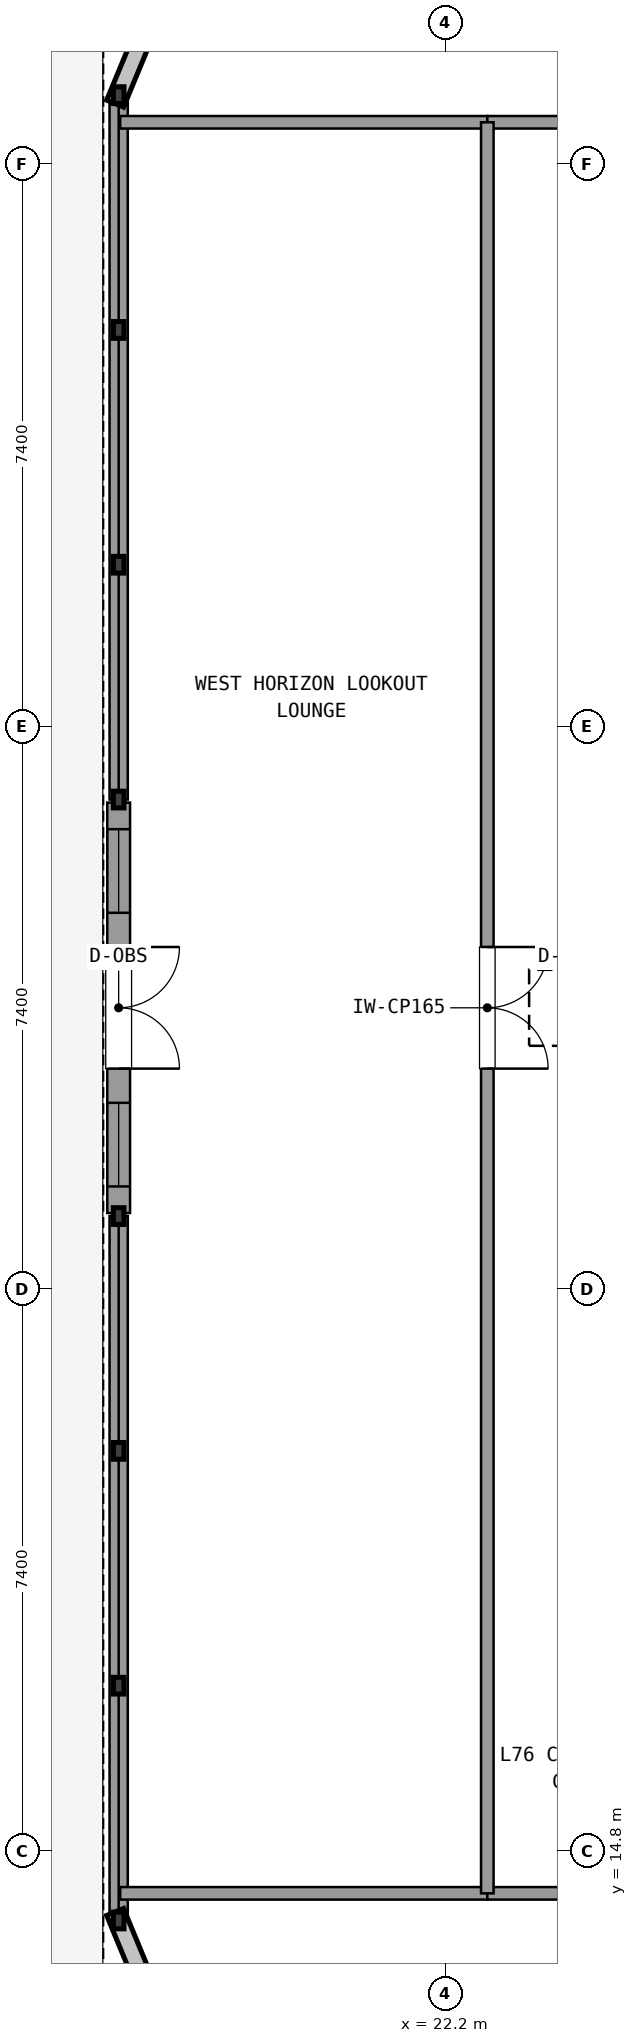
"""IFC4 building model, lengths in metres.
Left out: names, types, materials, properties, quantities, classifications, styles, units other than length and angle.
Written with IfcOpenShell. Run it as: python <this file> out.ifc"""

import sys

from ifc_helpers import new_model, si_unit, direction, frame, frame_2d, origin, origin_2d, place, context, subcontext, project, spatial, rectangle, extrude, element, fill, save


model = new_model("IFC4")
c1 = context("Model", 3, precision=1e-05, world=origin(), true_north=direction((0.0, 1.0)))
c2 = subcontext(c1, "Body", "Model", "MODEL_VIEW")
j1 = project(units=[si_unit("LENGTHUNIT", "METRE"), si_unit("PLANEANGLEUNIT", "RADIAN")], contexts=[c1])
p1 = place(None, origin())
s1 = spatial("IfcSite", under=j1, at=p1, CompositionType="ELEMENT")
p2 = place(p1, origin())
s2 = spatial("IfcBuilding", under=s1, at=p2, CompositionType="ELEMENT")
p3 = place(p2, frame((0.0, 0.0, 294.66)))
s3 = spatial("IfcBuildingStorey", under=s2, at=p3, CompositionType="ELEMENT", Elevation=294.66)
p4 = place(p3, frame((17.9, 28.6, 0.0), z_axis=(0.0, 0.0, 1.0), x_axis=(0.0, -1.0, 0.0)))
e1 = element("IfcWall", 1, at=p4, inside=s3, PredefinedType="SOLIDWALL", context=c2, shape_type="SweptSolid", body=[
    extrude(rectangle(XDim=5.4, YDim=0.3, at=frame_2d((2.7, 0.0))), origin(), (0.0, 0.0, 1.0), 3.46),
])
p5 = place(p4, frame((1.9, 0.0, 0.0)))
e2 = element("IfcOpeningElement", 2, at=p5, cuts=e1, PredefinedType="OPENING", context=c2, shape_type="SweptSolid", body=[
    extrude(rectangle(XDim=1.6, YDim=2.2, at=frame_2d((0.8, 1.1))), frame((0.0, 0.16, 0.0), z_axis=(0.0, -1.0, 0.0), x_axis=(1.0, 0.0, 0.0)), (0.0, 0.0, 1.0), 0.32),
])
p6 = place(p4, frame((0.35, 0.0, 0.4)))
e3 = element("IfcOpeningElement", 3, at=p6, cuts=e1, PredefinedType="OPENING", context=c2, shape_type="SweptSolid", body=[
    extrude(rectangle(XDim=1.1, YDim=1.8, at=frame_2d((0.55, 0.9))), frame((0.0, 0.16, 0.0), z_axis=(0.0, -1.0, 0.0), x_axis=(1.0, 0.0, 0.0)), (0.0, 0.0, 1.0), 0.32),
])
p7 = place(p4, frame((3.95, 0.0, 0.4)))
e4 = element("IfcOpeningElement", 4, at=p7, cuts=e1, PredefinedType="OPENING", context=c2, shape_type="SweptSolid", body=[
    extrude(rectangle(XDim=1.1, YDim=1.8, at=frame_2d((0.55, 0.9))), frame((0.0, 0.16, 0.0), z_axis=(0.0, -1.0, 0.0), x_axis=(1.0, 0.0, 0.0)), (0.0, 0.0, 1.0), 0.32),
])
p8 = place(p3, frame((17.9, 37.907, 0.0), z_axis=(0.0, 0.0, 1.0), x_axis=(0.0, -1.0, 0.0)))
e5 = element("IfcWall", 5, at=p8, inside=s3, PredefinedType="SOLIDWALL", context=c2, shape_type="SweptSolid", body=[
    extrude(rectangle(XDim=9.267, YDim=0.24, at=frame_2d((4.634, 0.0))), origin(), (0.0, 0.0, 1.0), 0.85),
])
p9 = place(p3, frame((17.9, 23.16, 0.0), z_axis=(0.0, 0.0, 1.0), x_axis=(0.0, -1.0, 0.0)))
e6 = element("IfcWall", 6, at=p9, inside=s3, PredefinedType="SOLIDWALL", context=c2, shape_type="SweptSolid", body=[
    extrude(rectangle(XDim=9.267, YDim=0.24, at=frame_2d((4.633, 0.0))), origin(), (0.0, 0.0, 1.0), 0.85),
])
for number, where, z_axis, x_axis in (
    (7, (17.92, 37.55, 0.0), (0.0, 0.0, 1.0), (1.0, 0.0, 0.0)),
    (8, (17.92, 14.25, 0.0), (0.0, 0.0, 1.0), (1.0, 0.0, 0.0)),
):
    element("IfcWall", number, at=place(p3, frame(where, z_axis=z_axis, x_axis=x_axis)), inside=s3, PredefinedType="PARTITIONING", context=c2, shape_type="SweptSolid", body=[
        extrude(rectangle(XDim=4.83, YDim=0.165, at=frame_2d((2.415, 0.0))), origin(), (0.0, 0.0, 1.0), 3.31),
    ])
p10 = place(p3, frame((22.75, 37.55, 0.0), z_axis=(0.0, 0.0, 1.0), x_axis=(1.0, 0.0, 0.0)))
e9 = element("IfcWall", 9, at=p10, inside=s3, PredefinedType="PARTITIONING", context=c2, shape_type="SweptSolid", body=[
    extrude(rectangle(XDim=7.038, YDim=0.165, at=frame_2d((3.519, 0.0))), origin(), (0.0, 0.0, 1.0), 3.31),
])
p11 = place(p10, frame((2.719, 0.0, 0.0)))
e10 = element("IfcOpeningElement", 10, at=p11, cuts=e9, PredefinedType="OPENING", context=c2, shape_type="SweptSolid", body=[
    extrude(rectangle(XDim=1.6, YDim=2.2, at=frame_2d((0.8, 1.1))), frame((0.0, 0.093, 0.0), z_axis=(0.0, -1.0, 0.0), x_axis=(1.0, 0.0, 0.0)), (0.0, 0.0, 1.0), 0.185),
])
p12 = place(p3, frame((22.75, 14.25, 0.0), z_axis=(0.0, 0.0, 1.0), x_axis=(1.0, 0.0, 0.0)))
e11 = element("IfcWall", 11, at=p12, inside=s3, PredefinedType="PARTITIONING", context=c2, shape_type="SweptSolid", body=[
    extrude(rectangle(XDim=7.038, YDim=0.165, at=frame_2d((3.519, 0.0))), origin(), (0.0, 0.0, 1.0), 3.31),
])
p13 = place(p12, frame((2.719, 0.0, 0.0)))
e12 = element("IfcOpeningElement", 12, at=p13, cuts=e11, PredefinedType="OPENING", context=c2, shape_type="SweptSolid", body=[
    extrude(rectangle(XDim=1.6, YDim=2.2, at=frame_2d((0.8, 1.1))), frame((0.0, 0.093, 0.0), z_axis=(0.0, -1.0, 0.0), x_axis=(1.0, 0.0, 0.0)), (0.0, 0.0, 1.0), 0.185),
])
p14 = place(p3, frame((22.75, 14.25, 0.0), z_axis=(0.0, 0.0, 1.0), x_axis=(0.0, 1.0, 0.0)))
e13 = element("IfcWall", 13, at=p14, inside=s3, PredefinedType="PARTITIONING", context=c2, shape_type="SweptSolid", body=[
    extrude(rectangle(XDim=23.3, YDim=0.165, at=frame_2d((11.65, 0.0))), origin(), (0.0, 0.0, 1.0), 3.31),
])
p15 = place(p14, frame((10.85, 0.0, 0.0)))
e14 = element("IfcOpeningElement", 14, at=p15, cuts=e13, PredefinedType="OPENING", context=c2, shape_type="SweptSolid", body=[
    extrude(rectangle(XDim=1.6, YDim=2.2, at=frame_2d((0.8, 1.1))), frame((0.0, 0.093, 0.0), z_axis=(0.0, -1.0, 0.0), x_axis=(1.0, 0.0, 0.0)), (0.0, 0.0, 1.0), 0.185),
])
p16 = place(p2, frame((0.0, 0.0, 298.98)))
p17 = place(p16, frame((0.0, 0.0, -0.3)))
p18 = place(p17, frame((23.8, 25.9, -0.01)))
p19 = place(p18, frame((0.0, 0.0, 0.29)))
e15 = element("IfcDoor", 15, at=p19, inside=s3, OperationType="SINGLE_SWING_LEFT", PredefinedType="TRAPDOOR", context=c2, shape_type="SweptSolid", body=[
    extrude(rectangle(XDim=1.0, YDim=1.0, at=origin_2d()), origin(), (0.0, 0.0, 1.0), 0.02),
])
p20 = place(p5, origin())
e16 = element("IfcDoor", 16, at=p20, inside=s3, OperationType="DOUBLE_DOOR_SINGLE_SWING", PredefinedType="DOOR", context=c2, shape_type="SweptSolid", body=[
    extrude(rectangle(XDim=1.6, YDim=2.2, at=frame_2d((0.8, 1.1))), frame((0.0, 0.025, 0.0), z_axis=(0.0, -1.0, 0.0), x_axis=(1.0, 0.0, 0.0)), (0.0, 0.0, 1.0), 0.05),
])
fill(e2, e16)
p21 = place(p6, origin())
e17 = element("IfcWindow", 17, at=p21, inside=s3, PartitioningType="SINGLE_PANEL", PredefinedType="WINDOW", context=c2, shape_type="SweptSolid", body=[
    extrude(rectangle(XDim=1.1, YDim=1.8, at=frame_2d((0.55, 0.9))), frame((0.0, 0.03, 0.0), z_axis=(0.0, -1.0, 0.0), x_axis=(1.0, 0.0, 0.0)), (0.0, 0.0, 1.0), 0.06),
])
fill(e3, e17)
p22 = place(p7, origin())
e18 = element("IfcWindow", 18, at=p22, inside=s3, PartitioningType="SINGLE_PANEL", PredefinedType="WINDOW", context=c2, shape_type="SweptSolid", body=[
    extrude(rectangle(XDim=1.1, YDim=1.8, at=frame_2d((0.55, 0.9))), frame((0.0, 0.03, 0.0), z_axis=(0.0, -1.0, 0.0), x_axis=(1.0, 0.0, 0.0)), (0.0, 0.0, 1.0), 0.06),
])
fill(e4, e18)
p23 = place(p15, frame((1.6, 0.0, 0.0), z_axis=(0.0, 0.0, 1.0), x_axis=(-1.0, 0.0, 0.0)))
e19 = element("IfcDoor", 19, at=p23, inside=s3, OperationType="DOUBLE_DOOR_SINGLE_SWING", PredefinedType="DOOR", context=c2, shape_type="SweptSolid", body=[
    extrude(rectangle(XDim=1.6, YDim=2.2, at=frame_2d((0.8, 1.1))), frame((0.0, 0.025, 0.0), z_axis=(0.0, -1.0, 0.0), x_axis=(1.0, 0.0, 0.0)), (0.0, 0.0, 1.0), 0.05),
])
fill(e14, e19)
save(model, sys.argv[1])
